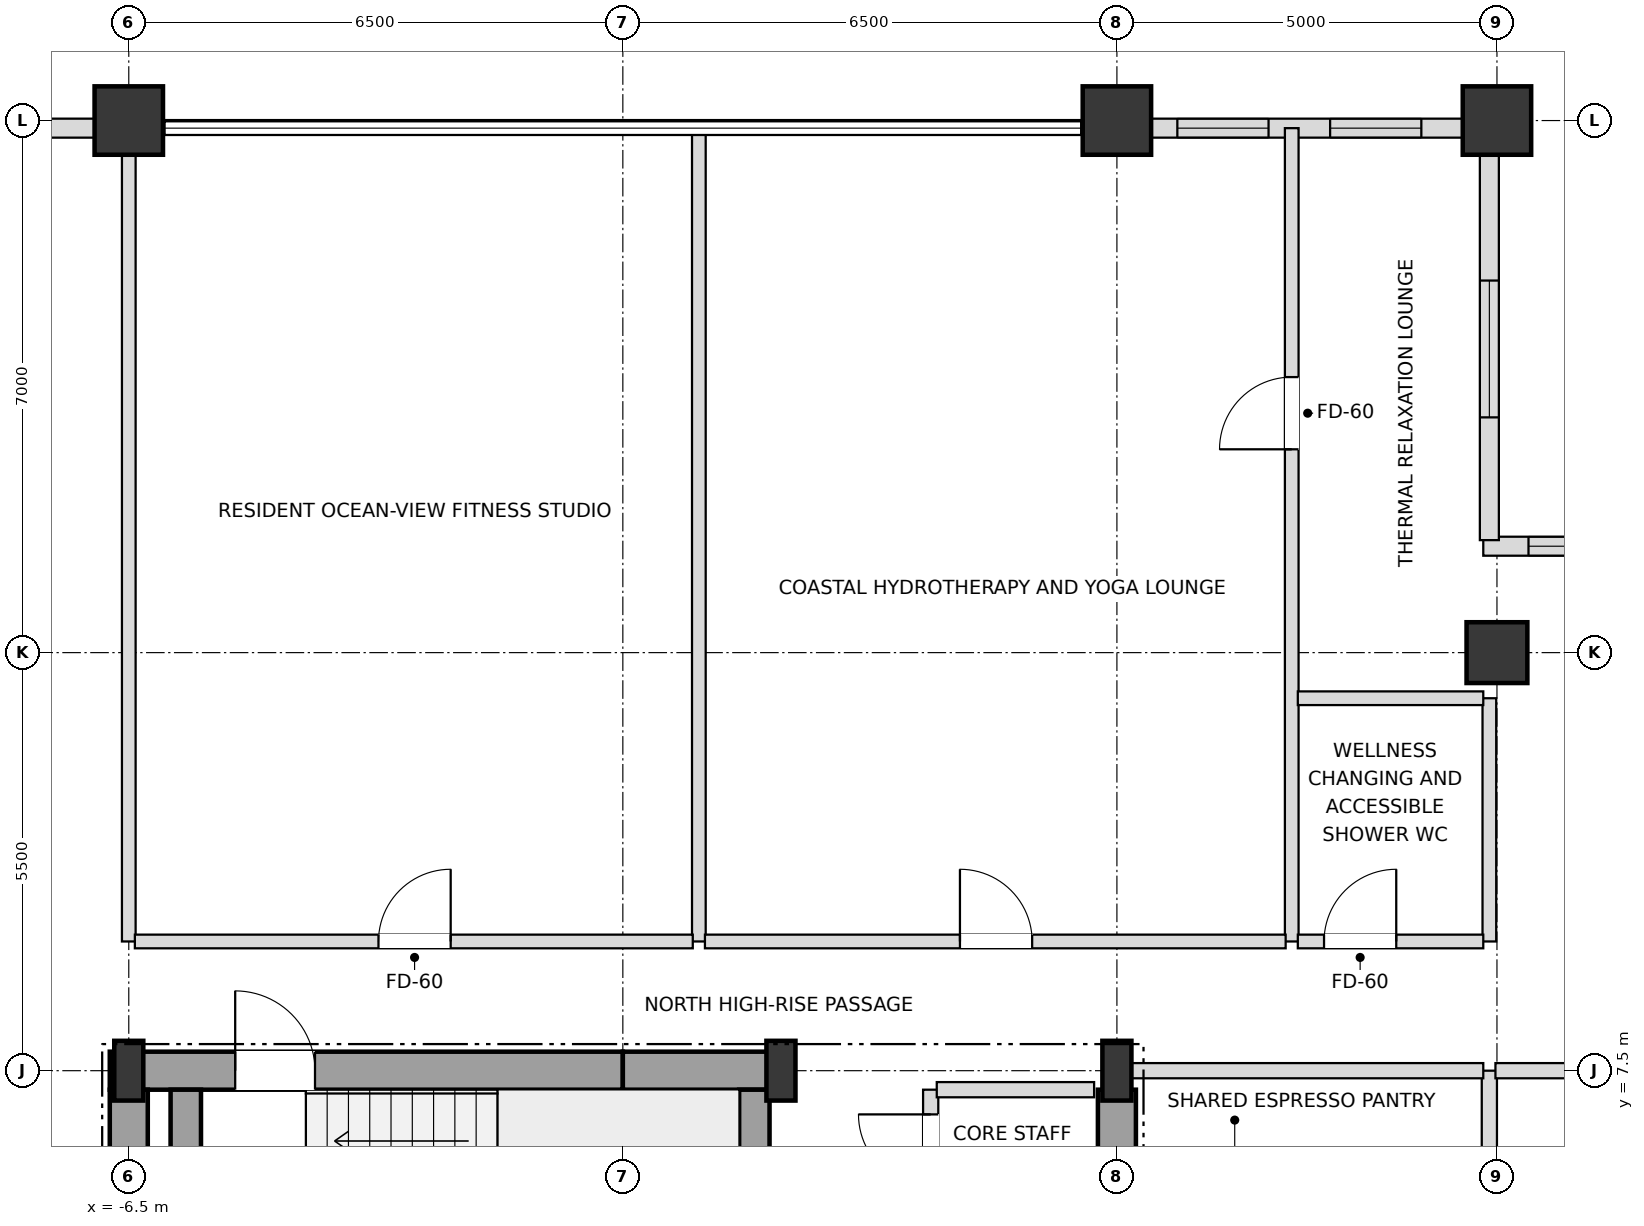
"""IFC4 building model, lengths in metres.
Left out: names, types, materials, properties, quantities, classifications, styles, units other than length and angle.
Written with IfcOpenShell. Run it as: python <this file> out.ifc"""

import sys

from ifc_helpers import new_model, si_unit, direction, frame, frame_2d, origin, origin_2d, place, context, subcontext, project, spatial, rectangle, i_section, extrude, element, fill, save


model = new_model("IFC4")
c1 = context("Model", 3, precision=1e-05, world=origin(), true_north=direction((0.0, 1.0)))
c2 = subcontext(c1, "Body", "Model", "MODEL_VIEW")
j1 = project(units=[si_unit("LENGTHUNIT", "METRE"), si_unit("PLANEANGLEUNIT", "RADIAN")], contexts=[c1])
p1 = place(None, origin())
s1 = spatial("IfcSite", under=j1, at=p1, CompositionType="ELEMENT")
p2 = place(p1, origin())
s2 = spatial("IfcBuilding", under=s1, at=p2, CompositionType="ELEMENT")
p3 = place(p2, frame((0.0, 0.0, 297.9)))
s3 = spatial("IfcBuildingStorey", under=s2, at=p3, CompositionType="ELEMENT", Elevation=297.9)
for number, where, z_axis, x_axis in (
    (1, (-6.5, 7.5, 0.0), (0.0, 0.0, 1.0), (1.0, 0.0, 0.0)),
    (2, (2.08, 7.5, 0.0), (0.0, 0.0, 1.0), (1.0, 0.0, 0.0)),
    (3, (6.5, 7.5, 0.0), (0.0, 0.0, 1.0), (1.0, 0.0, 0.0)),
):
    element("IfcColumn", number, at=place(p3, frame(where, z_axis=z_axis, x_axis=x_axis)), inside=s3, PredefinedType="COLUMN", context=c2, shape_type="SweptSolid", body=[
        extrude(i_section(OverallWidth=0.382, OverallDepth=0.786, WebThickness=0.02, FlangeThickness=0.033, at=origin_2d()), origin(), (0.0, 0.0, 1.0), 3.6),
    ])
for number, where, z_axis, x_axis in (
    (4, (11.5, 20.0, 0.0), (0.0, 0.0, 1.0), (1.0, 0.0, 0.0)),
    (5, (6.5, 20.0, 0.0), (0.0, 0.0, 1.0), (1.0, 0.0, 0.0)),
    (6, (-6.5, 20.0, 0.0), (0.0, 0.0, 1.0), (1.0, 0.0, 0.0)),
):
    element("IfcColumn", number, at=place(p3, frame(where, z_axis=z_axis, x_axis=x_axis)), inside=s3, PredefinedType="USERDEFINED", context=c2, shape_type="SweptSolid", body=[
        extrude(rectangle(XDim=0.9, YDim=0.9, at=origin_2d()), origin(), (0.0, 0.0, 1.0), 3.6),
    ])
p4 = place(p3, frame((11.5, 13.0, 0.0), z_axis=(0.0, 0.0, 1.0), x_axis=(1.0, 0.0, 0.0)))
e7 = element("IfcColumn", 7, at=p4, inside=s3, PredefinedType="COLUMN", context=c2, shape_type="SweptSolid", body=[
    extrude(rectangle(XDim=0.8, YDim=0.8, at=origin_2d()), origin(), (0.0, 0.0, 1.0), 3.6),
])
p5 = place(p3, frame((11.055, 19.9, 0.0), z_axis=(0.0, 0.0, 1.0), x_axis=(-1.0, 0.0, 0.0)))
e8 = element("IfcWall", 8, at=p5, inside=s3, PredefinedType="SOLIDWALL", context=c2, shape_type="SweptSolid", body=[
    extrude(rectangle(XDim=4.11, YDim=0.25, at=frame_2d((2.055, 0.0))), origin(), (0.0, 0.0, 1.0), 2.748),
])
p6 = place(p5, frame((0.55, 0.0, 0.72)))
e9 = element("IfcOpeningElement", 9, at=p6, cuts=e8, PredefinedType="OPENING", context=c2, shape_type="SweptSolid", body=[
    extrude(rectangle(XDim=1.2, YDim=1.68, at=frame_2d((0.6, 0.84))), frame((0.0, 0.135, 0.0), z_axis=(0.0, -1.0, 0.0), x_axis=(1.0, 0.0, 0.0)), (0.0, 0.0, 1.0), 0.27),
])
p7 = place(p5, frame((2.56, 0.0, 0.72)))
e10 = element("IfcOpeningElement", 10, at=p7, cuts=e8, PredefinedType="OPENING", context=c2, shape_type="SweptSolid", body=[
    extrude(rectangle(XDim=1.2, YDim=1.68, at=frame_2d((0.6, 0.84))), frame((0.0, 0.135, 0.0), z_axis=(0.0, -1.0, 0.0), x_axis=(1.0, 0.0, 0.0)), (0.0, 0.0, 1.0), 0.27),
])
p8 = place(p3, frame((-6.945, 19.9, 0.0), z_axis=(0.0, 0.0, 1.0), x_axis=(-1.0, 0.0, 0.0)))
e11 = element("IfcWall", 11, at=p8, inside=s3, PredefinedType="SOLIDWALL", context=c2, shape_type="SweptSolid", body=[
    extrude(rectangle(XDim=4.11, YDim=0.25, at=frame_2d((2.055, 0.0))), origin(), (0.0, 0.0, 1.0), 2.748),
])
p9 = place(p8, frame((1.155, 0.0, 0.72)))
e12 = element("IfcOpeningElement", 12, at=p9, cuts=e11, PredefinedType="OPENING", context=c2, shape_type="SweptSolid", body=[
    extrude(rectangle(XDim=1.8, YDim=1.68, at=frame_2d((0.9, 0.84))), frame((0.0, 0.135, 0.0), z_axis=(0.0, -1.0, 0.0), x_axis=(1.0, 0.0, 0.0)), (0.0, 0.0, 1.0), 0.27),
])
p10 = place(p3, frame((16.98, 14.4, 0.0), z_axis=(0.0, 0.0, 1.0), x_axis=(-1.0, 0.0, 0.0)))
e13 = element("IfcWall", 13, at=p10, inside=s3, PredefinedType="SOLIDWALL", context=c2, shape_type="SweptSolid", body=[
    extrude(rectangle(XDim=5.66, YDim=0.25, at=frame_2d((2.83, 0.0))), origin(), (0.0, 0.0, 1.0), 2.748),
])
p11 = place(p10, frame((0.595, 0.0, 0.72)))
e14 = element("IfcOpeningElement", 14, at=p11, cuts=e13, PredefinedType="OPENING", context=c2, shape_type="SweptSolid", body=[
    extrude(rectangle(XDim=1.8, YDim=1.68, at=frame_2d((0.9, 0.84))), frame((0.0, 0.135, 0.0), z_axis=(0.0, -1.0, 0.0), x_axis=(1.0, 0.0, 0.0)), (0.0, 0.0, 1.0), 0.27),
])
p12 = place(p10, frame((3.265, 0.0, 0.72)))
e15 = element("IfcOpeningElement", 15, at=p12, cuts=e13, PredefinedType="OPENING", context=c2, shape_type="SweptSolid", body=[
    extrude(rectangle(XDim=1.8, YDim=1.68, at=frame_2d((0.9, 0.84))), frame((0.0, 0.135, 0.0), z_axis=(0.0, -1.0, 0.0), x_axis=(1.0, 0.0, 0.0)), (0.0, 0.0, 1.0), 0.27),
])
p13 = place(p3, frame((11.4, 14.48, 0.0), z_axis=(0.0, 0.0, 1.0), x_axis=(0.0, 1.0, 0.0)))
e16 = element("IfcWall", 16, at=p13, inside=s3, PredefinedType="SOLIDWALL", context=c2, shape_type="SweptSolid", body=[
    extrude(rectangle(XDim=5.34, YDim=0.25, at=frame_2d((2.67, 0.0))), origin(), (0.0, 0.0, 1.0), 2.748),
])
p14 = place(p13, frame((1.615, 0.0, 0.72)))
e17 = element("IfcOpeningElement", 17, at=p14, cuts=e16, PredefinedType="OPENING", context=c2, shape_type="SweptSolid", body=[
    extrude(rectangle(XDim=1.8, YDim=1.68, at=frame_2d((0.9, 0.84))), frame((0.0, 0.135, 0.0), z_axis=(0.0, -1.0, 0.0), x_axis=(1.0, 0.0, 0.0)), (0.0, 0.0, 1.0), 0.27),
])
p15 = place(p3, frame((-6.75, 7.5, 0.0), z_axis=(0.0, 0.0, 1.0), x_axis=(1.0, 0.0, 0.0)))
e18 = element("IfcWall", 18, at=p15, inside=s3, PredefinedType="SHEAR", context=c2, shape_type="SweptSolid", body=[
    extrude(rectangle(XDim=6.75, YDim=0.5, at=frame_2d((3.375, 0.0))), origin(), (0.0, 0.0, 1.0), 3.38),
])
p16 = place(p15, frame((1.65, 0.0, 0.0)))
e19 = element("IfcOpeningElement", 19, at=p16, cuts=e18, PredefinedType="OPENING", context=c2, shape_type="SweptSolid", body=[
    extrude(rectangle(XDim=1.05, YDim=2.15, at=frame_2d((0.525, 1.075))), frame((0.0, 0.26, 0.0), z_axis=(0.0, -1.0, 0.0), x_axis=(1.0, 0.0, 0.0)), (0.0, 0.0, 1.0), 0.52),
])
p17 = place(p3, frame((0.0, 7.5, 0.0), z_axis=(0.0, 0.0, 1.0), x_axis=(1.0, 0.0, 0.0)))
e20 = element("IfcWall", 20, at=p17, inside=s3, PredefinedType="SHEAR", context=c2, shape_type="SweptSolid", body=[
    extrude(rectangle(XDim=2.08, YDim=0.5, at=frame_2d((1.04, 0.0))), origin(), (0.0, 0.0, 1.0), 3.38),
])
for number, where, z_axis, x_axis in (
    (21, (-6.5, 3.95, 0.0), (0.0, 0.0, 1.0), (0.0, 1.0, 0.0)),
    (22, (6.5, 3.95, 0.0), (0.0, 0.0, 1.0), (0.0, 1.0, 0.0)),
):
    element("IfcWall", number, at=place(p3, frame(where, z_axis=z_axis, x_axis=x_axis)), inside=s3, PredefinedType="SHEAR", context=c2, shape_type="SweptSolid", body=[
        extrude(rectangle(XDim=3.3, YDim=0.5, at=frame_2d((1.65, 0.0))), origin(), (0.0, 0.0, 1.0), 3.38),
    ])
for number, where, z_axis, x_axis in (
    (23, (1.73, 3.95, 0.0), (0.0, 0.0, 1.0), (0.0, 1.0, 0.0)),
    (24, (-5.75, 3.95, 0.0), (0.0, 0.0, 1.0), (0.0, 1.0, 0.0)),
):
    element("IfcWall", number, at=place(p3, frame(where, z_axis=z_axis, x_axis=x_axis)), inside=s3, PredefinedType="SHEAR", context=c2, shape_type="SweptSolid", body=[
        extrude(rectangle(XDim=3.3, YDim=0.4, at=frame_2d((1.65, 0.0))), origin(), (0.0, 0.0, 1.0), 3.38),
    ])
p18 = place(p3, frame((-6.5, 9.2, 0.0), z_axis=(0.0, 0.0, 1.0), x_axis=(0.0, 1.0, 0.0)))
e25 = element("IfcWall", 25, at=p18, inside=s3, PredefinedType="PARTITIONING", context=c2, shape_type="SweptSolid", body=[
    extrude(rectangle(XDim=10.7, YDim=0.18, at=frame_2d((5.35, 0.0))), origin(), (0.0, 0.0, 1.0), 2.826),
])
p19 = place(p3, frame((1.0, 9.2, 0.0), z_axis=(0.0, 0.0, 1.0), x_axis=(0.0, 1.0, 0.0)))
e26 = element("IfcWall", 26, at=p19, inside=s3, PredefinedType="PARTITIONING", context=c2, shape_type="SweptSolid", body=[
    extrude(rectangle(XDim=10.7, YDim=0.18, at=frame_2d((5.35, 0.0))), origin(), (0.0, 0.0, 1.0), 3.018),
])
p20 = place(p3, frame((4.05, 4.2, 0.0), z_axis=(0.0, 0.0, 1.0), x_axis=(0.0, 1.0, 0.0)))
e27 = element("IfcWall", 27, at=p20, inside=s3, PredefinedType="SOLIDWALL", context=c2, shape_type="SweptSolid", body=[
    extrude(rectangle(XDim=3.05, YDim=0.2, at=frame_2d((1.525, 0.0))), origin(), (0.0, 0.0, 1.0), 3.38),
])
p21 = place(p20, frame((0.275, 0.0, 0.0)))
e28 = element("IfcOpeningElement", 28, at=p21, cuts=e27, PredefinedType="OPENING", context=c2, shape_type="SweptSolid", body=[
    extrude(rectangle(XDim=0.95, YDim=2.15, at=frame_2d((0.475, 1.075))), frame((0.0, 0.11, 0.0), z_axis=(0.0, -1.0, 0.0), x_axis=(1.0, 0.0, 0.0)), (0.0, 0.0, 1.0), 0.22),
])
p22 = place(p20, frame((1.775, 0.0, 0.0)))
e29 = element("IfcOpeningElement", 29, at=p22, cuts=e27, PredefinedType="OPENING", context=c2, shape_type="SweptSolid", body=[
    extrude(rectangle(XDim=0.95, YDim=2.15, at=frame_2d((0.475, 1.075))), frame((0.0, 0.11, 0.0), z_axis=(0.0, -1.0, 0.0), x_axis=(1.0, 0.0, 0.0)), (0.0, 0.0, 1.0), 0.22),
])
p23 = place(p3, frame((8.8, 9.2, 0.0), z_axis=(0.0, 0.0, 1.0), x_axis=(0.0, 1.0, 0.0)))
e30 = element("IfcWall", 30, at=p23, inside=s3, PredefinedType="PARTITIONING", context=c2, shape_type="SweptSolid", body=[
    extrude(rectangle(XDim=10.7, YDim=0.18, at=frame_2d((5.35, 0.0))), origin(), (0.0, 0.0, 1.0), 2.826),
])
p24 = place(p23, frame((6.475, 0.0, 0.0)))
e31 = element("IfcOpeningElement", 31, at=p24, cuts=e30, PredefinedType="OPENING", context=c2, shape_type="SweptSolid", body=[
    extrude(rectangle(XDim=0.95, YDim=2.15, at=frame_2d((0.475, 1.075))), frame((0.0, 0.1, 0.0), z_axis=(0.0, -1.0, 0.0), x_axis=(1.0, 0.0, 0.0)), (0.0, 0.0, 1.0), 0.2),
])
p25 = place(p3, frame((11.4, 4.5, 0.0), z_axis=(0.0, 0.0, 1.0), x_axis=(0.0, 1.0, 0.0)))
e32 = element("IfcWall", 32, at=p25, inside=s3, PredefinedType="SOLIDWALL", context=c2, shape_type="SweptSolid", body=[
    extrude(rectangle(XDim=3.0, YDim=0.2, at=frame_2d((1.5, 0.0))), origin(), (0.0, 0.0, 1.0), 3.018),
])
p26 = place(p3, frame((11.4, 9.2, 0.0), z_axis=(0.0, 0.0, 1.0), x_axis=(0.0, 1.0, 0.0)))
e33 = element("IfcWall", 33, at=p26, inside=s3, PredefinedType="PARTITIONING", context=c2, shape_type="SweptSolid", body=[
    extrude(rectangle(XDim=3.2, YDim=0.18, at=frame_2d((1.6, 0.0))), origin(), (0.0, 0.0, 1.0), 3.38),
])
p27 = place(p3, frame((4.13, 7.25, 0.0), z_axis=(0.0, 0.0, 1.0), x_axis=(1.0, 0.0, 0.0)))
e34 = element("IfcWall", 34, at=p27, inside=s3, PredefinedType="SOLIDWALL", context=c2, shape_type="SweptSolid", body=[
    extrude(rectangle(XDim=2.07, YDim=0.2, at=frame_2d((1.035, 0.0))), origin(), (0.0, 0.0, 1.0), 3.38),
])
p28 = place(p3, frame((6.5, 7.5, 0.0), z_axis=(0.0, 0.0, 1.0), x_axis=(1.0, 0.0, 0.0)))
e35 = element("IfcWall", 35, at=p28, inside=s3, PredefinedType="SOLIDWALL", context=c2, shape_type="SweptSolid", body=[
    extrude(rectangle(XDim=4.82, YDim=0.2, at=frame_2d((2.41, 0.0))), origin(), (0.0, 0.0, 1.0), 2.826),
])
p29 = place(p3, frame((11.48, 7.5, 0.0), z_axis=(0.0, 0.0, 1.0), x_axis=(1.0, 0.0, 0.0)))
e36 = element("IfcWall", 36, at=p29, inside=s3, PredefinedType="SOLIDWALL", context=c2, shape_type="SweptSolid", body=[
    extrude(rectangle(XDim=5.42, YDim=0.2, at=frame_2d((2.71, 0.0))), origin(), (0.0, 0.0, 1.0), 2.826),
])
p30 = place(p3, frame((-6.42, 9.2, 0.0), z_axis=(0.0, 0.0, 1.0), x_axis=(1.0, 0.0, 0.0)))
e37 = element("IfcWall", 37, at=p30, inside=s3, PredefinedType="PARTITIONING", context=c2, shape_type="SweptSolid", body=[
    extrude(rectangle(XDim=7.34, YDim=0.18, at=frame_2d((3.67, 0.0))), origin(), (0.0, 0.0, 1.0), 3.38),
])
p31 = place(p30, frame((3.205, 0.0, 0.0)))
e38 = element("IfcOpeningElement", 38, at=p31, cuts=e37, PredefinedType="OPENING", context=c2, shape_type="SweptSolid", body=[
    extrude(rectangle(XDim=0.95, YDim=2.15, at=frame_2d((0.475, 1.075))), frame((0.0, 0.1, 0.0), z_axis=(0.0, -1.0, 0.0), x_axis=(1.0, 0.0, 0.0)), (0.0, 0.0, 1.0), 0.2),
])
p32 = place(p3, frame((1.08, 9.2, 0.0), z_axis=(0.0, 0.0, 1.0), x_axis=(1.0, 0.0, 0.0)))
e39 = element("IfcWall", 39, at=p32, inside=s3, PredefinedType="PARTITIONING", context=c2, shape_type="SweptSolid", body=[
    extrude(rectangle(XDim=7.64, YDim=0.18, at=frame_2d((3.82, 0.0))), origin(), (0.0, 0.0, 1.0), 2.826),
])
p33 = place(p32, frame((3.355, 0.0, 0.0)))
e40 = element("IfcOpeningElement", 40, at=p33, cuts=e39, PredefinedType="OPENING", context=c2, shape_type="SweptSolid", body=[
    extrude(rectangle(XDim=0.95, YDim=2.15, at=frame_2d((0.475, 1.075))), frame((0.0, 0.1, 0.0), z_axis=(0.0, -1.0, 0.0), x_axis=(1.0, 0.0, 0.0)), (0.0, 0.0, 1.0), 0.2),
])
p34 = place(p3, frame((8.88, 9.2, 0.0), z_axis=(0.0, 0.0, 1.0), x_axis=(1.0, 0.0, 0.0)))
e41 = element("IfcWall", 41, at=p34, inside=s3, PredefinedType="PARTITIONING", context=c2, shape_type="SweptSolid", body=[
    extrude(rectangle(XDim=2.44, YDim=0.18, at=frame_2d((1.22, 0.0))), origin(), (0.0, 0.0, 1.0), 3.38),
])
p35 = place(p34, frame((0.345, 0.0, 0.0)))
e42 = element("IfcOpeningElement", 42, at=p35, cuts=e41, PredefinedType="OPENING", context=c2, shape_type="SweptSolid", body=[
    extrude(rectangle(XDim=0.95, YDim=2.15, at=frame_2d((0.475, 1.075))), frame((0.0, 0.1, 0.0), z_axis=(0.0, -1.0, 0.0), x_axis=(1.0, 0.0, 0.0)), (0.0, 0.0, 1.0), 0.2),
])
p36 = place(p3, frame((8.88, 12.4, 0.0), z_axis=(0.0, 0.0, 1.0), x_axis=(1.0, 0.0, 0.0)))
e43 = element("IfcWall", 43, at=p36, inside=s3, PredefinedType="PARTITIONING", context=c2, shape_type="SweptSolid", body=[
    extrude(rectangle(XDim=2.44, YDim=0.18, at=frame_2d((1.22, 0.0))), origin(), (0.0, 0.0, 1.0), 3.38),
])
p37 = place(p6, origin())
e44 = element("IfcWindow", 44, at=p37, inside=s3, PartitioningType="SINGLE_PANEL", PredefinedType="WINDOW", context=c2, shape_type="SweptSolid", body=[
    extrude(rectangle(XDim=1.2, YDim=1.68, at=frame_2d((0.6, 0.84))), frame((0.0, 0.03, 0.0), z_axis=(0.0, -1.0, 0.0), x_axis=(1.0, 0.0, 0.0)), (0.0, 0.0, 1.0), 0.06),
])
fill(e9, e44)
p38 = place(p7, origin())
e45 = element("IfcWindow", 45, at=p38, inside=s3, PartitioningType="SINGLE_PANEL", PredefinedType="WINDOW", context=c2, shape_type="SweptSolid", body=[
    extrude(rectangle(XDim=1.2, YDim=1.68, at=frame_2d((0.6, 0.84))), frame((0.0, 0.03, 0.0), z_axis=(0.0, -1.0, 0.0), x_axis=(1.0, 0.0, 0.0)), (0.0, 0.0, 1.0), 0.06),
])
fill(e10, e45)
p39 = place(p12, origin())
e46 = element("IfcWindow", 46, at=p39, inside=s3, PartitioningType="SINGLE_PANEL", PredefinedType="WINDOW", context=c2, shape_type="SweptSolid", body=[
    extrude(rectangle(XDim=1.8, YDim=1.68, at=frame_2d((0.9, 0.84))), frame((0.0, 0.03, 0.0), z_axis=(0.0, -1.0, 0.0), x_axis=(1.0, 0.0, 0.0)), (0.0, 0.0, 1.0), 0.06),
])
fill(e15, e46)
p40 = place(p14, origin())
e47 = element("IfcWindow", 47, at=p40, inside=s3, PartitioningType="SINGLE_PANEL", PredefinedType="WINDOW", context=c2, shape_type="SweptSolid", body=[
    extrude(rectangle(XDim=1.8, YDim=1.68, at=frame_2d((0.9, 0.84))), frame((0.0, 0.03, 0.0), z_axis=(0.0, -1.0, 0.0), x_axis=(1.0, 0.0, 0.0)), (0.0, 0.0, 1.0), 0.06),
])
fill(e17, e47)
p41 = place(p16, origin())
e48 = element("IfcDoor", 48, at=p41, inside=s3, OperationType="SINGLE_SWING_LEFT", PredefinedType="DOOR", context=c2, shape_type="SweptSolid", body=[
    extrude(rectangle(XDim=1.05, YDim=2.15, at=frame_2d((0.525, 1.075))), frame((0.0, 0.025, 0.0), z_axis=(0.0, -1.0, 0.0), x_axis=(1.0, 0.0, 0.0)), (0.0, 0.0, 1.0), 0.05),
])
fill(e19, e48)
p42 = place(p22, origin())
e49 = element("IfcDoor", 49, at=p42, inside=s3, OperationType="SINGLE_SWING_RIGHT", PredefinedType="DOOR", context=c2, shape_type="SweptSolid", body=[
    extrude(rectangle(XDim=0.95, YDim=2.15, at=frame_2d((0.475, 1.075))), frame((0.0, 0.025, 0.0), z_axis=(0.0, -1.0, 0.0), x_axis=(1.0, 0.0, 0.0)), (0.0, 0.0, 1.0), 0.05),
])
fill(e29, e49)
p43 = place(p35, origin())
e50 = element("IfcDoor", 50, at=p43, inside=s3, OperationType="SINGLE_SWING_RIGHT", PredefinedType="DOOR", context=c2, shape_type="SweptSolid", body=[
    extrude(rectangle(XDim=0.95, YDim=2.15, at=frame_2d((0.475, 1.075))), frame((0.0, 0.025, 0.0), z_axis=(0.0, -1.0, 0.0), x_axis=(1.0, 0.0, 0.0)), (0.0, 0.0, 1.0), 0.05),
])
fill(e42, e50)
p44 = place(p24, origin())
e51 = element("IfcDoor", 51, at=p44, inside=s3, OperationType="SINGLE_SWING_LEFT", PredefinedType="DOOR", context=c2, shape_type="SweptSolid", body=[
    extrude(rectangle(XDim=0.95, YDim=2.15, at=frame_2d((0.475, 1.075))), frame((0.0, 0.025, 0.0), z_axis=(0.0, -1.0, 0.0), x_axis=(1.0, 0.0, 0.0)), (0.0, 0.0, 1.0), 0.05),
])
fill(e31, e51)
p45 = place(p31, origin())
e52 = element("IfcDoor", 52, at=p45, inside=s3, OperationType="SINGLE_SWING_RIGHT", PredefinedType="DOOR", context=c2, shape_type="SweptSolid", body=[
    extrude(rectangle(XDim=0.95, YDim=2.15, at=frame_2d((0.475, 1.075))), frame((0.0, 0.025, 0.0), z_axis=(0.0, -1.0, 0.0), x_axis=(1.0, 0.0, 0.0)), (0.0, 0.0, 1.0), 0.05),
])
fill(e38, e52)
p46 = place(p33, origin())
e53 = element("IfcDoor", 53, at=p46, inside=s3, OperationType="SINGLE_SWING_LEFT", PredefinedType="DOOR", context=c2, shape_type="SweptSolid", body=[
    extrude(rectangle(XDim=0.95, YDim=2.15, at=frame_2d((0.475, 1.075))), frame((0.0, 0.025, 0.0), z_axis=(0.0, -1.0, 0.0), x_axis=(1.0, 0.0, 0.0)), (0.0, 0.0, 1.0), 0.05),
])
fill(e40, e53)
save(model, sys.argv[1])
